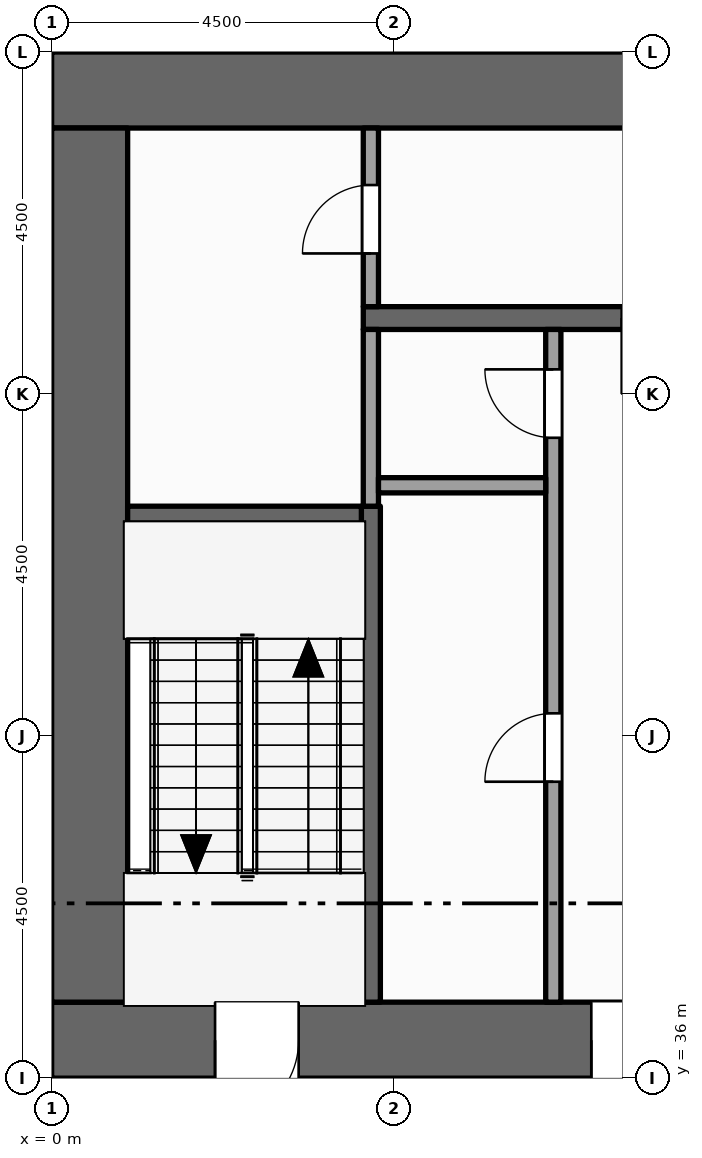
"""IFC4 building model, lengths in metres.
Left out: names, types, materials, properties, quantities, classifications, styles, units other than length and angle.
Written with IfcOpenShell. Run it as: python <this file> out.ifc"""

import sys

from ifc_helpers import new_model, si_unit, direction, frame, frame_2d, origin, place, context, subcontext, project, spatial, rectangle, extrude, element, fill, save


model = new_model("IFC4")
c1 = context("Model", 3, precision=1e-05, world=origin(), true_north=direction((0.0, 1.0)))
c2 = subcontext(c1, "Body", "Model", "MODEL_VIEW")
j1 = project(units=[si_unit("LENGTHUNIT", "METRE"), si_unit("PLANEANGLEUNIT", "RADIAN")], contexts=[c1])
p1 = place(None, origin())
s1 = spatial("IfcSite", under=j1, at=p1, CompositionType="ELEMENT")
p2 = place(p1, origin())
s2 = spatial("IfcBuilding", under=s1, at=p2, CompositionType="ELEMENT")
p3 = place(p2, frame((0.0, 0.0, 187.0)))
s3 = spatial("IfcBuildingStorey", under=s2, at=p3, CompositionType="ELEMENT", Elevation=187.0)
p4 = place(p3, frame((0.0, 36.5, -0.15), z_axis=(0.0, 0.0, 1.0), x_axis=(1.0, 0.0, 0.0)))
e1 = element("IfcWall", 1, at=p4, inside=s3, PredefinedType="SHEAR", context=c2, shape_type="SweptSolid", body=[
    extrude(rectangle(XDim=22.5, YDim=1.0, at=frame_2d((11.25, 0.0))), origin(), (0.0, 0.0, 1.0), 8.0),
])
p5 = place(p4, frame((7.1, 0.0, 0.15)))
e2 = element("IfcOpeningElement", 2, at=p5, cuts=e1, PredefinedType="OPENING", context=c2, shape_type="SweptSolid", body=[
    extrude(rectangle(XDim=1.8, YDim=2.1, at=frame_2d((0.9, 1.05))), frame((0.0, 0.51, 0.0), z_axis=(0.0, -1.0, 0.0), x_axis=(1.0, 0.0, 0.0)), (0.0, 0.0, 1.0), 1.02),
])
p6 = place(p4, frame((13.15, 0.0, 0.15)))
e3 = element("IfcOpeningElement", 3, at=p6, cuts=e1, PredefinedType="OPENING", context=c2, shape_type="SweptSolid", body=[
    extrude(rectangle(XDim=1.1, YDim=2.1, at=frame_2d((0.55, 1.05))), frame((0.0, 0.51, 0.0), z_axis=(0.0, -1.0, 0.0), x_axis=(1.0, 0.0, 0.0)), (0.0, 0.0, 1.0), 1.02),
])
p7 = place(p4, frame((2.15, 0.0, 0.15)))
e4 = element("IfcOpeningElement", 4, at=p7, cuts=e1, PredefinedType="OPENING", context=c2, shape_type="SweptSolid", body=[
    extrude(rectangle(XDim=1.1, YDim=2.1, at=frame_2d((0.55, 1.05))), frame((0.0, 0.51, 0.0), z_axis=(0.0, -1.0, 0.0), x_axis=(1.0, 0.0, 0.0)), (0.0, 0.0, 1.0), 1.02),
])
p8 = place(p4, frame((19.35, 0.0, 0.15)))
e5 = element("IfcOpeningElement", 5, at=p8, cuts=e1, PredefinedType="OPENING", context=c2, shape_type="SweptSolid", body=[
    extrude(rectangle(XDim=1.1, YDim=2.1, at=frame_2d((0.55, 1.05))), frame((0.0, 0.51, 0.0), z_axis=(0.0, -1.0, 0.0), x_axis=(1.0, 0.0, 0.0)), (0.0, 0.0, 1.0), 1.02),
])
p9 = place(p3, frame((0.0, 49.0, -0.15), z_axis=(0.0, 0.0, 1.0), x_axis=(1.0, 0.0, 0.0)))
e6 = element("IfcWall", 6, at=p9, inside=s3, PredefinedType="SHEAR", context=c2, shape_type="SweptSolid", body=[
    extrude(rectangle(XDim=22.5, YDim=1.0, at=frame_2d((11.25, 0.0))), origin(), (0.0, 0.0, 1.0), 8.0),
])
p10 = place(p3, frame((0.5, 37.0, -0.15), z_axis=(0.0, 0.0, 1.0), x_axis=(0.0, 1.0, 0.0)))
e7 = element("IfcWall", 7, at=p10, inside=s3, PredefinedType="SHEAR", context=c2, shape_type="SweptSolid", body=[
    extrude(rectangle(XDim=11.5, YDim=1.0, at=frame_2d((5.75, 0.0))), origin(), (0.0, 0.0, 1.0), 8.0),
])
p11 = place(p3, frame((4.2, 37.0, 0.0), z_axis=(0.0, 0.0, 1.0), x_axis=(0.0, 1.0, 0.0)))
e8 = element("IfcWall", 8, at=p11, inside=s3, PredefinedType="SHEAR", context=c2, shape_type="SweptSolid", body=[
    extrude(rectangle(XDim=6.525, YDim=0.25, at=frame_2d((3.262, 0.0))), origin(), (0.0, 0.0, 1.0), 7.85),
])
p12 = place(p3, frame((4.2, 43.525, 0.0), z_axis=(0.0, 0.0, 1.0), x_axis=(0.0, 1.0, 0.0)))
e9 = element("IfcWall", 9, at=p12, inside=s3, PredefinedType="PARTITIONING", context=c2, shape_type="SweptSolid", body=[
    extrude(rectangle(XDim=2.325, YDim=0.2, at=frame_2d((1.163, 0.0))), origin(), (0.0, 0.0, 1.0), 7.85),
])
p13 = place(p3, frame((4.2, 46.15, 0.0), z_axis=(0.0, 0.0, 1.0), x_axis=(0.0, 1.0, 0.0)))
e10 = element("IfcWall", 10, at=p13, inside=s3, PredefinedType="PARTITIONING", context=c2, shape_type="SweptSolid", body=[
    extrude(rectangle(XDim=2.35, YDim=0.2, at=frame_2d((1.175, 0.0))), origin(), (0.0, 0.0, 1.0), 7.85),
])
p14 = place(p13, frame((0.7, 0.0, 0.0)))
e11 = element("IfcOpeningElement", 11, at=p14, cuts=e10, PredefinedType="OPENING", context=c2, shape_type="SweptSolid", body=[
    extrude(rectangle(XDim=0.9, YDim=2.1, at=frame_2d((0.45, 1.05))), frame((0.0, 0.11, 0.0), z_axis=(0.0, -1.0, 0.0), x_axis=(1.0, 0.0, 0.0)), (0.0, 0.0, 1.0), 0.22),
])
p15 = place(p3, frame((6.6, 37.0, 0.0), z_axis=(0.0, 0.0, 1.0), x_axis=(0.0, 1.0, 0.0)))
e12 = element("IfcWall", 12, at=p15, inside=s3, PredefinedType="PARTITIONING", context=c2, shape_type="SweptSolid", body=[
    extrude(rectangle(XDim=8.85, YDim=0.2, at=frame_2d((4.425, 0.0))), origin(), (0.0, 0.0, 1.0), 7.85),
])
p16 = place(p15, frame((2.9, 0.0, 0.0)))
e13 = element("IfcOpeningElement", 13, at=p16, cuts=e12, PredefinedType="OPENING", context=c2, shape_type="SweptSolid", body=[
    extrude(rectangle(XDim=0.9, YDim=2.1, at=frame_2d((0.45, 1.05))), frame((0.0, 0.11, 0.0), z_axis=(0.0, -1.0, 0.0), x_axis=(1.0, 0.0, 0.0)), (0.0, 0.0, 1.0), 0.22),
])
p17 = place(p15, frame((7.425, 0.0, 0.0)))
e14 = element("IfcOpeningElement", 14, at=p17, cuts=e12, PredefinedType="OPENING", context=c2, shape_type="SweptSolid", body=[
    extrude(rectangle(XDim=0.9, YDim=2.1, at=frame_2d((0.45, 1.05))), frame((0.0, 0.11, 0.0), z_axis=(0.0, -1.0, 0.0), x_axis=(1.0, 0.0, 0.0)), (0.0, 0.0, 1.0), 0.22),
])
p18 = place(p3, frame((1.0, 43.4, 0.0), z_axis=(0.0, 0.0, 1.0), x_axis=(1.0, 0.0, 0.0)))
e15 = element("IfcWall", 15, at=p18, inside=s3, PredefinedType="SHEAR", context=c2, shape_type="SweptSolid", body=[
    extrude(rectangle(XDim=3.075, YDim=0.25, at=frame_2d((1.538, 0.0))), origin(), (0.0, 0.0, 1.0), 7.85),
])
p19 = place(p3, frame((4.3, 43.8, 0.0), z_axis=(0.0, 0.0, 1.0), x_axis=(1.0, 0.0, 0.0)))
e16 = element("IfcWall", 16, at=p19, inside=s3, PredefinedType="PARTITIONING", context=c2, shape_type="SweptSolid", body=[
    extrude(rectangle(XDim=2.2, YDim=0.2, at=frame_2d((1.1, 0.0))), origin(), (0.0, 0.0, 1.0), 7.85),
])
p20 = place(p3, frame((4.1, 46.0, 0.0), z_axis=(0.0, 0.0, 1.0), x_axis=(1.0, 0.0, 0.0)))
e17 = element("IfcWall", 17, at=p20, inside=s3, PredefinedType="SHEAR", context=c2, shape_type="SweptSolid", body=[
    extrude(rectangle(XDim=14.5, YDim=0.3, at=frame_2d((7.25, 0.0))), origin(), (0.0, 0.0, 1.0), 7.85),
])
p21 = place(p20, frame((3.4, 0.0, 0.0)))
e18 = element("IfcOpeningElement", 18, at=p21, cuts=e17, PredefinedType="OPENING", context=c2, shape_type="SweptSolid", body=[
    extrude(rectangle(XDim=1.0, YDim=2.1, at=frame_2d((0.5, 1.05))), frame((0.0, 0.16, 0.0), z_axis=(0.0, -1.0, 0.0), x_axis=(1.0, 0.0, 0.0)), (0.0, 0.0, 1.0), 0.32),
])
p22 = place(p20, frame((9.1, 0.0, 0.0)))
e19 = element("IfcOpeningElement", 19, at=p22, cuts=e17, PredefinedType="OPENING", context=c2, shape_type="SweptSolid", body=[
    extrude(rectangle(XDim=1.0, YDim=2.1, at=frame_2d((0.5, 1.05))), frame((0.0, 0.16, 0.0), z_axis=(0.0, -1.0, 0.0), x_axis=(1.0, 0.0, 0.0)), (0.0, 0.0, 1.0), 0.32),
])
p23 = place(p5, origin())
e20 = element("IfcDoor", 20, at=p23, inside=s3, OperationType="DOUBLE_DOOR_SINGLE_SWING", PredefinedType="DOOR", context=c2, shape_type="SweptSolid", body=[
    extrude(rectangle(XDim=1.8, YDim=2.1, at=frame_2d((0.9, 1.05))), frame((0.0, 0.025, 0.0), z_axis=(0.0, -1.0, 0.0), x_axis=(1.0, 0.0, 0.0)), (0.0, 0.0, 1.0), 0.05),
])
fill(e2, e20)
p24 = place(p7, origin())
e21 = element("IfcDoor", 21, at=p24, inside=s3, OperationType="SINGLE_SWING_LEFT", PredefinedType="DOOR", context=c2, shape_type="SweptSolid", body=[
    extrude(rectangle(XDim=1.1, YDim=2.1, at=frame_2d((0.55, 1.05))), frame((0.0, 0.025, 0.0), z_axis=(0.0, -1.0, 0.0), x_axis=(1.0, 0.0, 0.0)), (0.0, 0.0, 1.0), 0.05),
])
fill(e4, e21)
p25 = place(p14, origin())
e22 = element("IfcDoor", 22, at=p25, inside=s3, OperationType="SINGLE_SWING_LEFT", PredefinedType="DOOR", context=c2, shape_type="SweptSolid", body=[
    extrude(rectangle(XDim=0.9, YDim=2.1, at=frame_2d((0.45, 1.05))), frame((0.0, 0.025, 0.0), z_axis=(0.0, -1.0, 0.0), x_axis=(1.0, 0.0, 0.0)), (0.0, 0.0, 1.0), 0.05),
])
fill(e11, e22)
p26 = place(p16, origin())
e23 = element("IfcDoor", 23, at=p26, inside=s3, OperationType="SINGLE_SWING_LEFT", PredefinedType="DOOR", context=c2, shape_type="SweptSolid", body=[
    extrude(rectangle(XDim=0.9, YDim=2.1, at=frame_2d((0.45, 1.05))), frame((0.0, 0.025, 0.0), z_axis=(0.0, -1.0, 0.0), x_axis=(1.0, 0.0, 0.0)), (0.0, 0.0, 1.0), 0.05),
])
fill(e13, e23)
p27 = place(p17, origin())
e24 = element("IfcDoor", 24, at=p27, inside=s3, OperationType="SINGLE_SWING_RIGHT", PredefinedType="DOOR", context=c2, shape_type="SweptSolid", body=[
    extrude(rectangle(XDim=0.9, YDim=2.1, at=frame_2d((0.45, 1.05))), frame((0.0, 0.025, 0.0), z_axis=(0.0, -1.0, 0.0), x_axis=(1.0, 0.0, 0.0)), (0.0, 0.0, 1.0), 0.05),
])
fill(e14, e24)
save(model, sys.argv[1])
